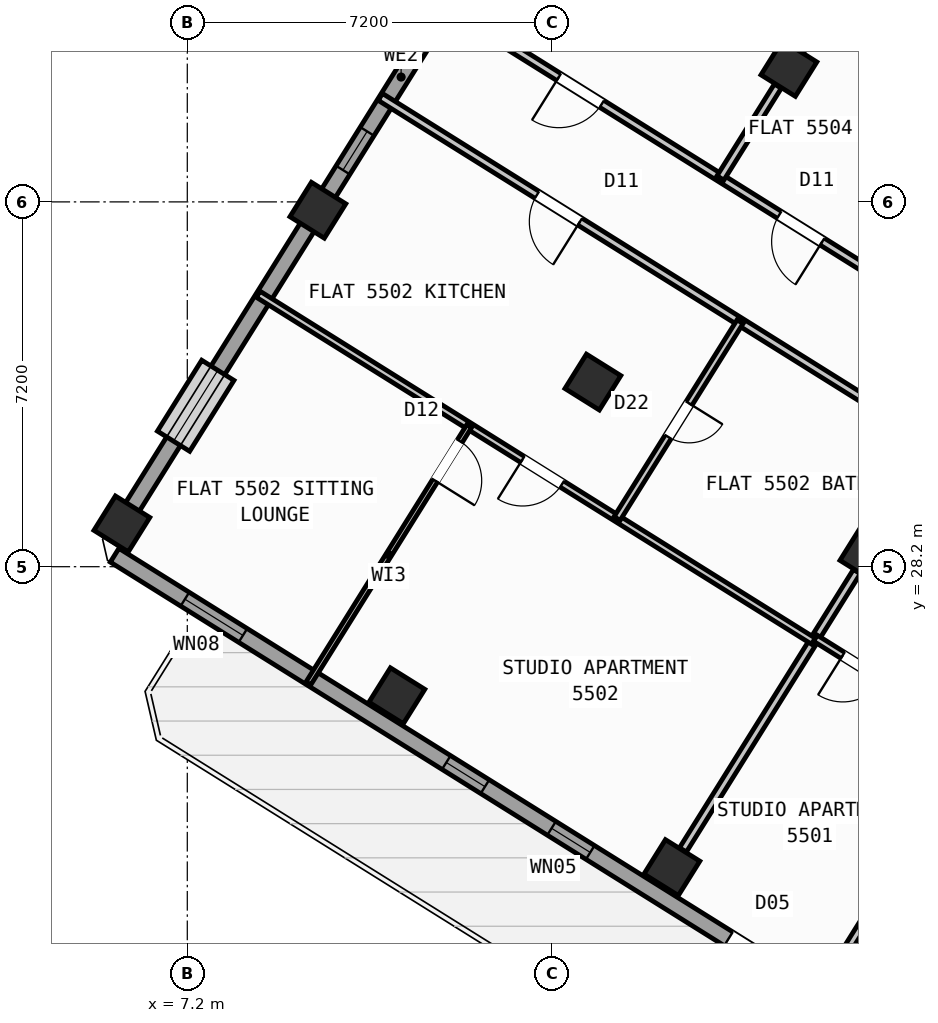
"""IFC4 building model, lengths in metres.
Left out: names, types, materials, properties, quantities, classifications, styles, units other than length and angle.
Written with IfcOpenShell. Run it as: python <this file> out.ifc"""

import sys

from ifc_helpers import new_model, si_unit, direction, frame, frame_2d, origin, origin_2d, place, context, subcontext, project, spatial, rectangle, hollow_rectangle, extrude, source, transform, mapped, element, fill, save


model = new_model("IFC4")
c1 = context("Model", 3, precision=1e-05, world=origin(), true_north=direction((0.0, 1.0)))
c2 = subcontext(c1, "Body", "Model", "MODEL_VIEW")
j1 = project(units=[si_unit("LENGTHUNIT", "METRE"), si_unit("PLANEANGLEUNIT", "RADIAN")], contexts=[c1])
p1 = place(None, origin())
s1 = spatial("IfcSite", under=j1, at=p1, CompositionType="ELEMENT")
p2 = place(p1, origin())
s2 = spatial("IfcBuilding", under=s1, at=p2, CompositionType="ELEMENT")
p3 = place(p2, frame((0.0, 0.0, 218.4)))
s3 = spatial("IfcBuildingStorey", under=s2, at=p3, CompositionType="ELEMENT", Elevation=218.4)
m1 = source(origin(), c2, "Body", "SweptSolid", [
    extrude(hollow_rectangle(XDim=0.8, YDim=0.8, WallThickness=0.032, at=origin_2d()), origin(), (0.0, 0.0, 1.0), 3.6),
])
for number, where, z_axis, x_axis in (
    (1, (20.632, 28.452, 0.0), (0.0, 0.0, 1.0), (-0.848, 0.53, 0.0)),
    (2, (16.764, 22.261, 0.0), (0.0, 0.0, 1.0), (-0.848, 0.53, 0.0)),
    (3, (19.073, 38.034, 0.0), (0.0, 0.0, 1.0), (-0.848, 0.53, 0.0)),
    (4, (15.205, 31.844, 0.0), (0.0, 0.0, 1.0), (-0.848, 0.53, 0.0)),
    (5, (11.336, 25.653, 0.0), (0.0, 0.0, 1.0), (-0.848, 0.53, 0.0)),
    (6, (9.777, 35.235, 0.0), (0.0, 0.0, 1.0), (-0.848, 0.53, 0.0)),
    (7, (5.909, 29.044, 0.0), (0.0, 0.0, 1.0), (-0.848, 0.53, 0.0)),
):
    element("IfcColumn", number, at=place(p3, frame(where, z_axis=z_axis, x_axis=x_axis)), inside=s3, PredefinedType="COLUMN", context=c2, shape_type="MappedRepresentation", body=[
        mapped(m1, transform((0.0, 0.0, 0.0), scale=1.0)),
    ])
p4 = place(p3, frame((31.76, 12.183, 0.0), z_axis=(0.0, 0.0, 1.0), x_axis=(-0.848047074256, 0.529920899612, 0.0)))
e8 = element("IfcWall", 8, at=p4, inside=s3, PredefinedType="STANDARD", context=c2, shape_type="SweptSolid", body=[
    extrude(rectangle(XDim=30.652, YDim=0.32, at=frame_2d((15.326, 0.0))), origin(), (0.0, 0.0, 1.0), 3.35),
])
p5 = place(p4, frame((15.166, 0.0, 0.0)))
e9 = element("IfcOpeningElement", 9, at=p5, cuts=e8, PredefinedType="OPENING", context=c2, shape_type="SweptSolid", body=[
    extrude(rectangle(XDim=1.2, YDim=2.15, at=frame_2d((0.6, 1.075))), frame((0.0, 0.17, 0.0), z_axis=(0.0, -1.0, 0.0), x_axis=(1.0, 0.0, 0.0)), (0.0, 0.0, 1.0), 0.34),
])
p6 = place(p4, frame((2.24, 0.0, 0.9)))
e10 = element("IfcOpeningElement", 10, at=p6, cuts=e8, PredefinedType="OPENING", context=c2, shape_type="SweptSolid", body=[
    extrude(rectangle(XDim=1.65, YDim=1.45, at=frame_2d((0.825, 0.725))), frame((0.0, 0.17, 0.0), z_axis=(0.0, -1.0, 0.0), x_axis=(1.0, 0.0, 0.0)), (0.0, 0.0, 1.0), 0.34),
])
p7 = place(p4, frame((7.469, 0.0, 0.9)))
e11 = element("IfcOpeningElement", 11, at=p7, cuts=e8, PredefinedType="OPENING", context=c2, shape_type="SweptSolid", body=[
    extrude(rectangle(XDim=1.65, YDim=1.45, at=frame_2d((0.825, 0.725))), frame((0.0, 0.17, 0.0), z_axis=(0.0, -1.0, 0.0), x_axis=(1.0, 0.0, 0.0)), (0.0, 0.0, 1.0), 0.34),
])
p8 = place(p4, frame((12.623, 0.0, 1.0)))
e12 = element("IfcOpeningElement", 12, at=p8, cuts=e8, PredefinedType="OPENING", context=c2, shape_type="SweptSolid", body=[
    extrude(rectangle(XDim=0.9, YDim=1.25, at=frame_2d((0.45, 0.625))), frame((0.0, 0.17, 0.0), z_axis=(0.0, -1.0, 0.0), x_axis=(1.0, 0.0, 0.0)), (0.0, 0.0, 1.0), 0.34),
])
p9 = place(p4, frame((19.583, 0.0, 1.0)))
e13 = element("IfcOpeningElement", 13, at=p9, cuts=e8, PredefinedType="OPENING", context=c2, shape_type="SweptSolid", body=[
    extrude(rectangle(XDim=0.9, YDim=1.25, at=frame_2d((0.45, 0.625))), frame((0.0, 0.17, 0.0), z_axis=(0.0, -1.0, 0.0), x_axis=(1.0, 0.0, 0.0)), (0.0, 0.0, 1.0), 0.34),
])
p10 = place(p4, frame((22.033, 0.0, 1.0)))
e14 = element("IfcOpeningElement", 14, at=p10, cuts=e8, PredefinedType="OPENING", context=c2, shape_type="SweptSolid", body=[
    extrude(rectangle(XDim=0.9, YDim=1.25, at=frame_2d((0.45, 0.625))), frame((0.0, 0.17, 0.0), z_axis=(0.0, -1.0, 0.0), x_axis=(1.0, 0.0, 0.0)), (0.0, 0.0, 1.0), 0.34),
])
p11 = place(p4, frame((27.666, 0.0, 0.9)))
e15 = element("IfcOpeningElement", 15, at=p11, cuts=e8, PredefinedType="OPENING", context=c2, shape_type="SweptSolid", body=[
    extrude(rectangle(XDim=1.35, YDim=1.45, at=frame_2d((0.675, 0.725))), frame((0.0, 0.17, 0.0), z_axis=(0.0, -1.0, 0.0), x_axis=(1.0, 0.0, 0.0)), (0.0, 0.0, 1.0), 0.34),
])
p12 = place(p3, frame((5.7, 28.71, 0.0), z_axis=(0.0, 0.0, 1.0), x_axis=(0.529923711467, 0.8480453172, 0.0)))
e16 = element("IfcWall", 16, at=p12, inside=s3, PredefinedType="STANDARD", context=c2, shape_type="SweptSolid", body=[
    extrude(rectangle(XDim=21.587, YDim=0.32, at=frame_2d((10.794, 0.0))), origin(), (0.0, 0.0, 1.0), 2.825),
])
p13 = place(p12, frame((2.319, 0.0, 0.9)))
e17 = element("IfcOpeningElement", 17, at=p13, cuts=e16, PredefinedType="OPENING", context=c2, shape_type="SweptSolid", body=[
    extrude(rectangle(XDim=1.65, YDim=1.45, at=frame_2d((0.825, 0.725))), frame((0.0, 0.17, 0.0), z_axis=(0.0, -1.0, 0.0), x_axis=(1.0, 0.0, 0.0)), (0.0, 0.0, 1.0), 0.34),
])
p14 = place(p12, frame((8.629, 0.0, 1.0)))
e18 = element("IfcOpeningElement", 18, at=p14, cuts=e16, PredefinedType="OPENING", context=c2, shape_type="SweptSolid", body=[
    extrude(rectangle(XDim=0.9, YDim=1.25, at=frame_2d((0.45, 0.625))), frame((0.0, 0.17, 0.0), z_axis=(0.0, -1.0, 0.0), x_axis=(1.0, 0.0, 0.0)), (0.0, 0.0, 1.0), 0.34),
])
p15 = place(p12, frame((13.159, 0.0, 1.0)))
e19 = element("IfcOpeningElement", 19, at=p15, cuts=e16, PredefinedType="OPENING", context=c2, shape_type="SweptSolid", body=[
    extrude(rectangle(XDim=0.9, YDim=1.25, at=frame_2d((0.45, 0.625))), frame((0.0, 0.17, 0.0), z_axis=(0.0, -1.0, 0.0), x_axis=(1.0, 0.0, 0.0)), (0.0, 0.0, 1.0), 0.34),
])
p16 = place(p12, frame((16.232, 0.0, 1.0)))
e20 = element("IfcOpeningElement", 20, at=p16, cuts=e16, PredefinedType="OPENING", context=c2, shape_type="SweptSolid", body=[
    extrude(rectangle(XDim=0.9, YDim=1.25, at=frame_2d((0.45, 0.625))), frame((0.0, 0.17, 0.0), z_axis=(0.0, -1.0, 0.0), x_axis=(1.0, 0.0, 0.0)), (0.0, 0.0, 1.0), 0.34),
])
p17 = place(p12, frame((18.925, 0.0, 0.9)))
e21 = element("IfcOpeningElement", 21, at=p17, cuts=e16, PredefinedType="OPENING", context=c2, shape_type="SweptSolid", body=[
    extrude(rectangle(XDim=1.35, YDim=1.45, at=frame_2d((0.675, 0.725))), frame((0.0, 0.17, 0.0), z_axis=(0.0, -1.0, 0.0), x_axis=(1.0, 0.0, 0.0)), (0.0, 0.0, 1.0), 0.34),
])
p18 = place(p3, frame((17.424, 47.083, 0.0), z_axis=(0.0, 0.0, 1.0), x_axis=(0.848049927979, -0.529916332693, 0.0)))
e22 = element("IfcWall", 22, at=p18, inside=s3, PredefinedType="STANDARD", context=c2, shape_type="SweptSolid", body=[
    extrude(rectangle(XDim=29.223, YDim=0.32, at=frame_2d((14.612, 0.0))), origin(), (0.0, 0.0, 1.0), 3.35),
])
p19 = place(p18, frame((3.77, 0.0, 0.0)))
e23 = element("IfcOpeningElement", 23, at=p19, cuts=e22, PredefinedType="OPENING", context=c2, shape_type="SweptSolid", body=[
    extrude(rectangle(XDim=1.05, YDim=2.15, at=frame_2d((0.525, 1.075))), frame((0.0, 0.17, 0.0), z_axis=(0.0, -1.0, 0.0), x_axis=(1.0, 0.0, 0.0)), (0.0, 0.0, 1.0), 0.34),
])
p20 = place(p18, frame((1.125, 0.0, 0.9)))
e24 = element("IfcOpeningElement", 24, at=p20, cuts=e22, PredefinedType="OPENING", context=c2, shape_type="SweptSolid", body=[
    extrude(rectangle(XDim=1.65, YDim=1.45, at=frame_2d((0.825, 0.725))), frame((0.0, 0.17, 0.0), z_axis=(0.0, -1.0, 0.0), x_axis=(1.0, 0.0, 0.0)), (0.0, 0.0, 1.0), 0.34),
])
p21 = place(p18, frame((7.384, 0.0, 0.9)))
e25 = element("IfcOpeningElement", 25, at=p21, cuts=e22, PredefinedType="OPENING", context=c2, shape_type="SweptSolid", body=[
    extrude(rectangle(XDim=1.35, YDim=1.45, at=frame_2d((0.675, 0.725))), frame((0.0, 0.17, 0.0), z_axis=(0.0, -1.0, 0.0), x_axis=(1.0, 0.0, 0.0)), (0.0, 0.0, 1.0), 0.34),
])
p22 = place(p18, frame((10.054, 0.0, 0.9)))
e26 = element("IfcOpeningElement", 26, at=p22, cuts=e22, PredefinedType="OPENING", context=c2, shape_type="SweptSolid", body=[
    extrude(rectangle(XDim=1.35, YDim=1.45, at=frame_2d((0.675, 0.725))), frame((0.0, 0.17, 0.0), z_axis=(0.0, -1.0, 0.0), x_axis=(1.0, 0.0, 0.0)), (0.0, 0.0, 1.0), 0.34),
])
p23 = place(p18, frame((14.039, 0.0, 1.0)))
e27 = element("IfcOpeningElement", 27, at=p23, cuts=e22, PredefinedType="OPENING", context=c2, shape_type="SweptSolid", body=[
    extrude(rectangle(XDim=0.9, YDim=1.25, at=frame_2d((0.45, 0.625))), frame((0.0, 0.17, 0.0), z_axis=(0.0, -1.0, 0.0), x_axis=(1.0, 0.0, 0.0)), (0.0, 0.0, 1.0), 0.34),
])
p24 = place(p18, frame((17.254, 0.0, 1.0)))
e28 = element("IfcOpeningElement", 28, at=p24, cuts=e22, PredefinedType="OPENING", context=c2, shape_type="SweptSolid", body=[
    extrude(rectangle(XDim=0.9, YDim=1.25, at=frame_2d((0.45, 0.625))), frame((0.0, 0.17, 0.0), z_axis=(0.0, -1.0, 0.0), x_axis=(1.0, 0.0, 0.0)), (0.0, 0.0, 1.0), 0.34),
])
p25 = place(p18, frame((20.161, 0.0, 0.9)))
e29 = element("IfcOpeningElement", 29, at=p25, cuts=e22, PredefinedType="OPENING", context=c2, shape_type="SweptSolid", body=[
    extrude(rectangle(XDim=1.35, YDim=1.45, at=frame_2d((0.675, 0.725))), frame((0.0, 0.17, 0.0), z_axis=(0.0, -1.0, 0.0), x_axis=(1.0, 0.0, 0.0)), (0.0, 0.0, 1.0), 0.34),
])
p26 = place(p18, frame((22.846, 0.0, 0.9)))
e30 = element("IfcOpeningElement", 30, at=p26, cuts=e22, PredefinedType="OPENING", context=c2, shape_type="SweptSolid", body=[
    extrude(rectangle(XDim=1.35, YDim=1.45, at=frame_2d((0.675, 0.725))), frame((0.0, 0.17, 0.0), z_axis=(0.0, -1.0, 0.0), x_axis=(1.0, 0.0, 0.0)), (0.0, 0.0, 1.0), 0.34),
])
p27 = place(p18, frame((26.898, 0.0, 1.0)))
e31 = element("IfcOpeningElement", 31, at=p27, cuts=e22, PredefinedType="OPENING", context=c2, shape_type="SweptSolid", body=[
    extrude(rectangle(XDim=0.9, YDim=1.25, at=frame_2d((0.45, 0.625))), frame((0.0, 0.17, 0.0), z_axis=(0.0, -1.0, 0.0), x_axis=(1.0, 0.0, 0.0)), (0.0, 0.0, 1.0), 0.34),
])
p28 = place(p3, frame((25.198, 28.606, 0.0), z_axis=(0.0, 0.0, 1.0), x_axis=(-0.529926497642, -0.848043576178, 0.0)))
e32 = element("IfcWall", 32, at=p28, inside=s3, PredefinedType="PARTITIONING", context=c2, shape_type="SweptSolid", body=[
    extrude(rectangle(XDim=10.3, YDim=0.16, at=frame_2d((5.15, 0.0))), origin(), (0.0, 0.0, 1.0), 3.34),
])
p29 = place(p3, frame((26.363, 30.472, 0.0), z_axis=(0.0, 0.0, 1.0), x_axis=(-0.848052408131, 0.529912363569, 0.0)))
e33 = element("IfcWall", 33, at=p29, inside=s3, PredefinedType="PARTITIONING", context=c2, shape_type="SweptSolid", body=[
    extrude(rectangle(XDim=16.73, YDim=0.16, at=frame_2d((8.365, 0.0))), origin(), (0.0, 0.0, 1.0), 3.34),
])
p30 = place(p29, frame((2.22, 0.0, 0.0)))
e34 = element("IfcOpeningElement", 34, at=p30, cuts=e33, PredefinedType="OPENING", context=c2, shape_type="SweptSolid", body=[
    extrude(rectangle(XDim=0.86, YDim=2.05, at=frame_2d((0.43, 1.025))), frame((0.0, 0.09, 0.0), z_axis=(0.0, -1.0, 0.0), x_axis=(1.0, 0.0, 0.0)), (0.0, 0.0, 1.0), 0.18),
])
p31 = place(p29, frame((7.82, 0.0, 0.0)))
e35 = element("IfcOpeningElement", 35, at=p31, cuts=e33, PredefinedType="OPENING", context=c2, shape_type="SweptSolid", body=[
    extrude(rectangle(XDim=1.0, YDim=2.1, at=frame_2d((0.5, 1.05))), frame((0.0, 0.09, 0.0), z_axis=(0.0, -1.0, 0.0), x_axis=(1.0, 0.0, 0.0)), (0.0, 0.0, 1.0), 0.18),
])
p32 = place(p29, frame((12.95, 0.0, 0.0)))
e36 = element("IfcOpeningElement", 36, at=p32, cuts=e33, PredefinedType="OPENING", context=c2, shape_type="SweptSolid", body=[
    extrude(rectangle(XDim=1.0, YDim=2.1, at=frame_2d((0.5, 1.05))), frame((0.0, 0.09, 0.0), z_axis=(0.0, -1.0, 0.0), x_axis=(1.0, 0.0, 0.0)), (0.0, 0.0, 1.0), 0.18),
])
p33 = place(p3, frame((25.198, 28.606, 0.0), z_axis=(0.0, 0.0, 1.0), x_axis=(-0.848052408131, 0.529912363569, 0.0)))
e37 = element("IfcWall", 37, at=p33, inside=s3, PredefinedType="PARTITIONING", context=c2, shape_type="SweptSolid", body=[
    extrude(rectangle(XDim=16.73, YDim=0.16, at=frame_2d((8.365, 0.0))), origin(), (0.0, 0.0, 1.0), 3.34),
])
p34 = place(p33, frame((2.22, 0.0, 0.0)))
e38 = element("IfcOpeningElement", 38, at=p34, cuts=e37, PredefinedType="OPENING", context=c2, shape_type="SweptSolid", body=[
    extrude(rectangle(XDim=0.86, YDim=2.05, at=frame_2d((0.43, 1.025))), frame((0.0, 0.09, 0.0), z_axis=(0.0, -1.0, 0.0), x_axis=(1.0, 0.0, 0.0)), (0.0, 0.0, 1.0), 0.18),
])
p35 = place(p33, frame((12.084, 0.0, 0.0)))
e39 = element("IfcOpeningElement", 39, at=p35, cuts=e37, PredefinedType="OPENING", context=c2, shape_type="SweptSolid", body=[
    extrude(rectangle(XDim=1.0, YDim=2.1, at=frame_2d((0.5, 1.05))), frame((0.0, 0.09, 0.0), z_axis=(0.0, -1.0, 0.0), x_axis=(1.0, 0.0, 0.0)), (0.0, 0.0, 1.0), 0.18),
])
p36 = place(p3, frame((20.414, 28.103, 0.0), z_axis=(0.0, 0.0, 1.0), x_axis=(-0.529934553702, -0.848038542045, 0.0)))
e40 = element("IfcWall", 40, at=p36, inside=s3, PredefinedType="PARTITIONING", context=c2, shape_type="SweptSolid", body=[
    extrude(rectangle(XDim=6.476, YDim=0.16, at=frame_2d((3.238, 0.0))), origin(), (0.0, 0.0, 1.0), 2.825),
])
p37 = place(p3, frame((22.807, 24.781, 0.0), z_axis=(0.0, 0.0, 1.0), x_axis=(-0.84803087207, 0.529946827537, 0.0)))
e41 = element("IfcWall", 41, at=p37, inside=s3, PredefinedType="PLUMBINGWALL", context=c2, shape_type="SweptSolid", body=[
    extrude(rectangle(XDim=3.79, YDim=0.14, at=frame_2d((1.895, 0.0))), origin(), (0.0, 0.0, 1.0), 3.34),
])
p38 = place(p37, frame((2.23, 0.0, 0.0)))
e42 = element("IfcOpeningElement", 42, at=p38, cuts=e41, PredefinedType="OPENING", context=c2, shape_type="SweptSolid", body=[
    extrude(rectangle(XDim=0.92, YDim=2.08, at=frame_2d((0.46, 1.04))), frame((0.0, 0.08, 0.0), z_axis=(0.0, -1.0, 0.0), x_axis=(1.0, 0.0, 0.0)), (0.0, 0.0, 1.0), 0.16),
])
p39 = place(p3, frame((19.556, 26.73, 0.0), z_axis=(0.0, 0.0, 1.0), x_axis=(-0.848043949058, 0.52992590092, 0.0)))
e43 = element("IfcWall", 43, at=p39, inside=s3, PredefinedType="PLUMBINGWALL", context=c2, shape_type="SweptSolid", body=[
    extrude(rectangle(XDim=12.92, YDim=0.14, at=frame_2d((6.46, 0.0))), origin(), (0.0, 0.0, 1.0), 3.34),
])
p40 = place(p39, frame((5.849, 0.0, 0.0)))
e44 = element("IfcOpeningElement", 44, at=p40, cuts=e43, PredefinedType="OPENING", context=c2, shape_type="SweptSolid", body=[
    extrude(rectangle(XDim=0.92, YDim=2.08, at=frame_2d((0.46, 1.04))), frame((0.0, 0.08, 0.0), z_axis=(0.0, -1.0, 0.0), x_axis=(1.0, 0.0, 0.0)), (0.0, 0.0, 1.0), 0.16),
])
p41 = place(p3, frame((18.109, 33.035, 0.0), z_axis=(0.0, 0.0, 1.0), x_axis=(-0.529893526057, -0.848064178611, 0.0)))
e45 = element("IfcWall", 45, at=p41, inside=s3, PredefinedType="PLUMBINGWALL", context=c2, shape_type="SweptSolid", body=[
    extrude(rectangle(XDim=4.58, YDim=0.14, at=frame_2d((2.29, 0.0))), origin(), (0.0, 0.0, 1.0), 3.34),
])
p42 = place(p41, frame((1.9, 0.0, 0.0)))
e46 = element("IfcOpeningElement", 46, at=p42, cuts=e45, PredefinedType="OPENING", context=c2, shape_type="SweptSolid", body=[
    extrude(rectangle(XDim=0.78, YDim=2.05, at=frame_2d((0.39, 1.025))), frame((0.0, 0.08, 0.0), z_axis=(0.0, -1.0, 0.0), x_axis=(1.0, 0.0, 0.0)), (0.0, 0.0, 1.0), 0.16),
])
p43 = place(p3, frame((12.763, 30.975, 0.0), z_axis=(0.0, 0.0, 1.0), x_axis=(-0.529947646893, -0.848030360042, 0.0)))
e47 = element("IfcWall", 47, at=p43, inside=s3, PredefinedType="PARTITIONING", context=c2, shape_type="SweptSolid", body=[
    extrude(rectangle(XDim=5.99, YDim=0.11, at=frame_2d((2.995, 0.0))), origin(), (0.0, 0.0, 1.0), 3.34),
])
p44 = place(p43, frame((0.35, 0.0, 0.0)))
e48 = element("IfcOpeningElement", 48, at=p44, cuts=e47, PredefinedType="OPENING", context=c2, shape_type="SweptSolid", body=[
    extrude(rectangle(XDim=0.92, YDim=2.08, at=frame_2d((0.46, 1.04))), frame((0.0, 0.065, 0.0), z_axis=(0.0, -1.0, 0.0), x_axis=(1.0, 0.0, 0.0)), (0.0, 0.0, 1.0), 0.13),
])
p45 = place(p3, frame((22.206, 43.049, 0.0), z_axis=(0.0, 0.0, 1.0), x_axis=(-0.529919150083, -0.848048167486, 0.0)))
e49 = element("IfcWall", 49, at=p45, inside=s3, PredefinedType="PARTITIONING", context=c2, shape_type="SweptSolid", body=[
    extrude(rectangle(XDim=5.501, YDim=0.16, at=frame_2d((2.75, 0.0))), origin(), (0.0, 0.0, 1.0), 2.825),
])
p46 = place(p3, frame((18.854, 37.685, 0.0), z_axis=(0.0, 0.0, 1.0), x_axis=(-0.52989628283, -0.848062456098, 0.0)))
e50 = element("IfcWall", 50, at=p46, inside=s3, PredefinedType="PARTITIONING", context=c2, shape_type="SweptSolid", body=[
    extrude(rectangle(XDim=2.138, YDim=0.16, at=frame_2d((1.069, 0.0))), origin(), (0.0, 0.0, 1.0), 2.825),
])
p47 = place(p3, frame((25.576, 36.365, 0.0), z_axis=(0.0, 0.0, 1.0), x_axis=(-0.848056163074, 0.529906354247, 0.0)))
e51 = element("IfcWall", 51, at=p47, inside=s3, PredefinedType="PLUMBINGWALL", context=c2, shape_type="SweptSolid", body=[
    extrude(rectangle(XDim=6.4, YDim=0.14, at=frame_2d((3.2, 0.0))), origin(), (0.0, 0.0, 1.0), 3.34),
])
p48 = place(p47, frame((4.04, 0.0, 0.0)))
e52 = element("IfcOpeningElement", 52, at=p48, cuts=e51, PredefinedType="OPENING", context=c2, shape_type="SweptSolid", body=[
    extrude(rectangle(XDim=0.92, YDim=2.08, at=frame_2d((0.46, 1.04))), frame((0.0, 0.08, 0.0), z_axis=(0.0, -1.0, 0.0), x_axis=(1.0, 0.0, 0.0)), (0.0, 0.0, 1.0), 0.16),
])
m2 = source(origin(), c2, "Body", "SweptSolid", [
    extrude(rectangle(XDim=1.2, YDim=2.15, at=frame_2d((0.6, 1.075))), frame((0.0, 0.025, 0.0), z_axis=(0.0, -1.0, 0.0), x_axis=(1.0, 0.0, 0.0)), (0.0, 0.0, 1.0), 0.05),
])
p49 = place(p5, origin())
e53 = element("IfcDoor", 53, at=p49, inside=s3, OperationType="SINGLE_SWING_LEFT", PredefinedType="DOOR", context=c2, shape_type="MappedRepresentation", body=[
    mapped(m2, transform((0.0, 0.0, 0.0), scale=1.0)),
])
fill(e9, e53)
m3 = source(origin(), c2, "Body", "SweptSolid", [
    extrude(rectangle(XDim=0.9, YDim=1.25, at=frame_2d((0.45, 0.625))), frame((0.0, 0.03, 0.0), z_axis=(0.0, -1.0, 0.0), x_axis=(1.0, 0.0, 0.0)), (0.0, 0.0, 1.0), 0.06),
])
p50 = place(p9, origin())
e54 = element("IfcWindow", 54, at=p50, inside=s3, PartitioningType="SINGLE_PANEL", PredefinedType="WINDOW", context=c2, shape_type="MappedRepresentation", body=[
    mapped(m3, transform((0.0, 0.0, 0.0), scale=1.0)),
])
fill(e13, e54)
p51 = place(p10, origin())
e55 = element("IfcWindow", 55, at=p51, inside=s3, PartitioningType="SINGLE_PANEL", PredefinedType="WINDOW", context=c2, shape_type="MappedRepresentation", body=[
    mapped(m3, transform((0.0, 0.0, 0.0), scale=1.0)),
])
fill(e14, e55)
m4 = source(origin(), c2, "Body", "SweptSolid", [
    extrude(rectangle(XDim=1.35, YDim=1.45, at=frame_2d((0.675, 0.725))), frame((0.0, 0.03, 0.0), z_axis=(0.0, -1.0, 0.0), x_axis=(1.0, 0.0, 0.0)), (0.0, 0.0, 1.0), 0.06),
])
p52 = place(p11, origin())
e56 = element("IfcWindow", 56, at=p52, inside=s3, PartitioningType="SINGLE_PANEL", PredefinedType="WINDOW", context=c2, shape_type="MappedRepresentation", body=[
    mapped(m4, transform((0.0, 0.0, 0.0), scale=1.0)),
])
fill(e15, e56)
m5 = source(origin(), c2, "Body", "SweptSolid", [
    extrude(rectangle(XDim=1.65, YDim=1.45, at=frame_2d((0.825, 0.725))), frame((0.0, 0.03, 0.0), z_axis=(0.0, -1.0, 0.0), x_axis=(1.0, 0.0, 0.0)), (0.0, 0.0, 1.0), 0.06),
])
p53 = place(p13, origin())
e57 = element("IfcWindow", 57, at=p53, inside=s3, PartitioningType="SINGLE_PANEL", PredefinedType="WINDOW", context=c2, shape_type="MappedRepresentation", body=[
    mapped(m5, transform((0.0, 0.0, 0.0), scale=1.0)),
])
fill(e17, e57)
p54 = place(p14, origin())
e58 = element("IfcWindow", 58, at=p54, inside=s3, PartitioningType="SINGLE_PANEL", PredefinedType="WINDOW", context=c2, shape_type="MappedRepresentation", body=[
    mapped(m3, transform((0.0, 0.0, 0.0), scale=1.0)),
])
fill(e18, e58)
m6 = source(origin(), c2, "Body", "SweptSolid", [
    extrude(rectangle(XDim=0.92, YDim=2.08, at=frame_2d((0.46, 1.04))), frame((0.0, 0.025, 0.0), z_axis=(0.0, -1.0, 0.0), x_axis=(1.0, 0.0, 0.0)), (0.0, 0.0, 1.0), 0.05),
])
p55 = place(p38, origin())
e59 = element("IfcDoor", 59, at=p55, inside=s3, OperationType="SINGLE_SWING_RIGHT", PredefinedType="DOOR", context=c2, shape_type="MappedRepresentation", body=[
    mapped(m6, transform((0.0, 0.0, 0.0), scale=1.0)),
])
fill(e42, e59)
p56 = place(p44, origin())
e60 = element("IfcDoor", 60, at=p56, inside=s3, OperationType="SINGLE_SWING_RIGHT", PredefinedType="DOOR", context=c2, shape_type="MappedRepresentation", body=[
    mapped(m6, transform((0.0, 0.0, 0.0), scale=1.0)),
])
fill(e48, e60)
m7 = source(origin(), c2, "Body", "SweptSolid", [
    extrude(rectangle(XDim=1.0, YDim=2.1, at=frame_2d((0.5, 1.05))), frame((0.0, 0.025, 0.0), z_axis=(0.0, -1.0, 0.0), x_axis=(1.0, 0.0, 0.0)), (0.0, 0.0, 1.0), 0.05),
])
p57 = place(p35, origin())
e61 = element("IfcDoor", 61, at=p57, inside=s3, OperationType="SINGLE_SWING_LEFT", PredefinedType="DOOR", context=c2, shape_type="MappedRepresentation", body=[
    mapped(m7, transform((0.0, 0.0, 0.0), scale=1.0)),
])
fill(e39, e61)
p58 = place(p40, origin())
e62 = element("IfcDoor", 62, at=p58, inside=s3, OperationType="SINGLE_SWING_RIGHT", PredefinedType="DOOR", context=c2, shape_type="MappedRepresentation", body=[
    mapped(m6, transform((0.0, 0.0, 0.0), scale=1.0)),
])
fill(e44, e62)
m8 = source(origin(), c2, "Body", "SweptSolid", [
    extrude(rectangle(XDim=0.78, YDim=2.05, at=frame_2d((0.39, 1.025))), frame((0.0, 0.025, 0.0), z_axis=(0.0, -1.0, 0.0), x_axis=(1.0, 0.0, 0.0)), (0.0, 0.0, 1.0), 0.05),
])
p59 = place(p42, origin())
e63 = element("IfcDoor", 63, at=p59, inside=s3, OperationType="SINGLE_SWING_LEFT", PredefinedType="DOOR", context=c2, shape_type="MappedRepresentation", body=[
    mapped(m8, transform((0.0, 0.0, 0.0), scale=1.0)),
])
fill(e46, e63)
p60 = place(p31, origin())
e64 = element("IfcDoor", 64, at=p60, inside=s3, OperationType="SINGLE_SWING_LEFT", PredefinedType="DOOR", context=c2, shape_type="MappedRepresentation", body=[
    mapped(m7, transform((0.0, 0.0, 0.0), scale=1.0)),
])
fill(e35, e64)
p61 = place(p32, origin())
e65 = element("IfcDoor", 65, at=p61, inside=s3, OperationType="SINGLE_SWING_RIGHT", PredefinedType="DOOR", context=c2, shape_type="MappedRepresentation", body=[
    mapped(m7, transform((0.0, 0.0, 0.0), scale=1.0)),
])
fill(e36, e65)
save(model, sys.argv[1])
